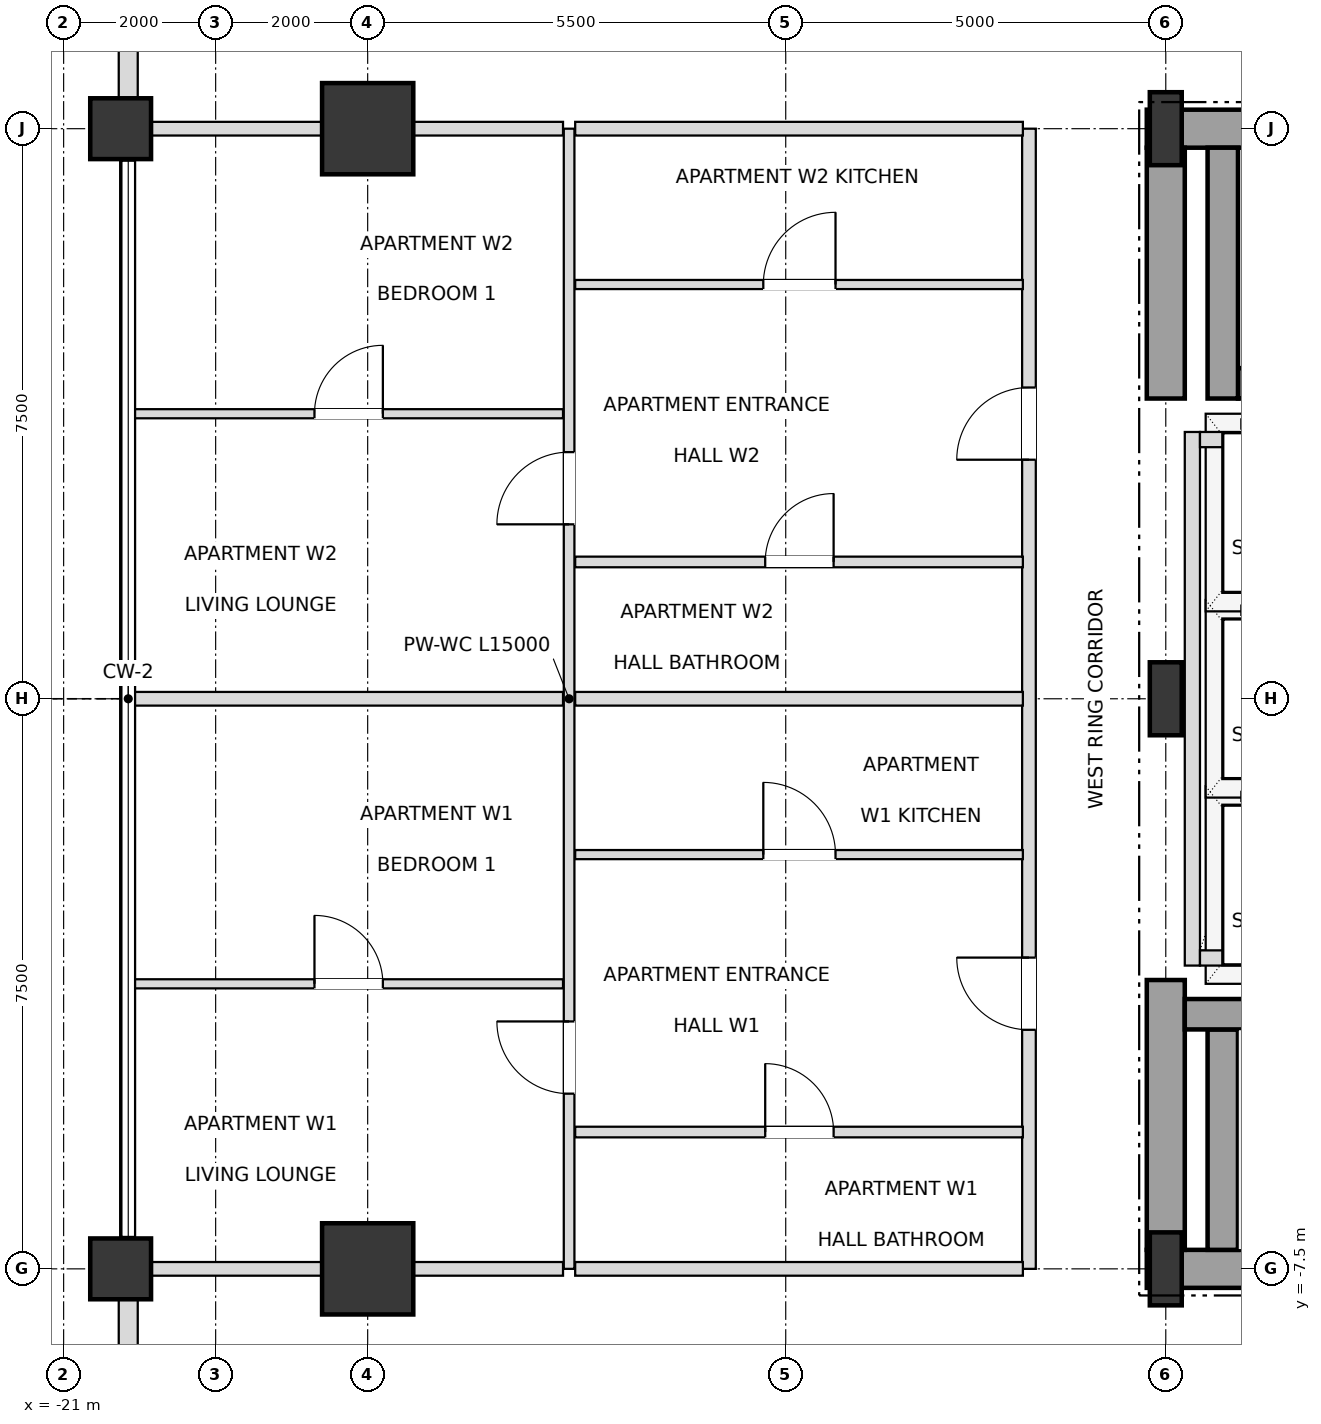
"""IFC4 building model, lengths in metres.
Left out: names, types, materials, properties, quantities, classifications, styles, units other than length and angle.
Written with IfcOpenShell. Run it as: python <this file> out.ifc"""

import sys

from ifc_helpers import new_model, si_unit, direction, frame, frame_2d, origin, origin_2d, place, context, subcontext, project, spatial, rectangle, i_section, extrude, element, fill, save


model = new_model("IFC4")
c1 = context("Model", 3, precision=1e-05, world=origin(), true_north=direction((0.0, 1.0)))
c2 = subcontext(c1, "Body", "Model", "MODEL_VIEW")
j1 = project(units=[si_unit("LENGTHUNIT", "METRE"), si_unit("PLANEANGLEUNIT", "RADIAN")], contexts=[c1])
p1 = place(None, origin())
s1 = spatial("IfcSite", under=j1, at=p1, CompositionType="ELEMENT")
p2 = place(p1, origin())
s2 = spatial("IfcBuilding", under=s1, at=p2, CompositionType="ELEMENT")
p3 = place(p2, frame((0.0, 0.0, 99.0)))
s3 = spatial("IfcBuildingStorey", under=s2, at=p3, CompositionType="ELEMENT", Elevation=99.0)
for number, where, z_axis, x_axis in (
    (1, (-6.5, -7.5, 0.0), (0.0, 0.0, 1.0), (1.0, 0.0, 0.0)),
    (2, (-6.5, 0.0, 0.0), (0.0, 0.0, 1.0), (1.0, 0.0, 0.0)),
    (3, (-6.5, 7.5, 0.0), (0.0, 0.0, 1.0), (1.0, 0.0, 0.0)),
):
    element("IfcColumn", number, at=place(p3, frame(where, z_axis=z_axis, x_axis=x_axis)), inside=s3, PredefinedType="COLUMN", context=c2, shape_type="SweptSolid", body=[
        extrude(i_section(OverallWidth=0.42, OverallDepth=0.96, WebThickness=0.022, FlangeThickness=0.034, at=origin_2d()), origin(), (0.0, 0.0, 1.0), 3.6),
    ])
for number, where, z_axis, x_axis in (
    (4, (-17.0, 7.5, 0.0), (0.0, 0.0, 1.0), (1.0, 0.0, 0.0)),
    (5, (-17.0, -7.5, 0.0), (0.0, 0.0, 1.0), (1.0, 0.0, 0.0)),
):
    element("IfcColumn", number, at=place(p3, frame(where, z_axis=z_axis, x_axis=x_axis)), inside=s3, PredefinedType="USERDEFINED", context=c2, shape_type="SweptSolid", body=[
        extrude(rectangle(XDim=1.2, YDim=1.2, at=origin_2d()), origin(), (0.0, 0.0, 1.0), 3.6),
    ])
for number, where, z_axis, x_axis in (
    (6, (-20.25, -7.5, 0.0), (0.0, 0.0, 1.0), (1.0, 0.0, 0.0)),
    (7, (-20.25, 7.5, 0.0), (0.0, 0.0, 1.0), (1.0, 0.0, 0.0)),
):
    element("IfcColumn", number, at=place(p3, frame(where, z_axis=z_axis, x_axis=x_axis)), inside=s3, PredefinedType="COLUMN", context=c2, shape_type="SweptSolid", body=[
        extrude(rectangle(XDim=0.8, YDim=0.8, at=origin_2d()), origin(), (0.0, 0.0, 1.0), 3.6),
    ])
p4 = place(p3, frame((-20.15, 12.605, 0.0), z_axis=(0.0, 0.0, 1.0), x_axis=(0.0, -1.0, 0.0)))
e8 = element("IfcWall", 8, at=p4, inside=s3, PredefinedType="SOLIDWALL", context=c2, shape_type="SweptSolid", body=[
    extrude(rectangle(XDim=4.71, YDim=0.25, at=frame_2d((2.355, 0.0))), origin(), (0.0, 0.0, 1.0), 2.736),
])
p5 = place(p4, frame((1.455, 0.0, 0.72)))
e9 = element("IfcOpeningElement", 9, at=p5, cuts=e8, PredefinedType="OPENING", context=c2, shape_type="SweptSolid", body=[
    extrude(rectangle(XDim=1.8, YDim=1.68, at=frame_2d((0.9, 0.84))), frame((0.0, 0.135, 0.0), z_axis=(0.0, -1.0, 0.0), x_axis=(1.0, 0.0, 0.0)), (0.0, 0.0, 1.0), 0.27),
])
p6 = place(p3, frame((-20.15, -7.895, 0.0), z_axis=(0.0, 0.0, 1.0), x_axis=(0.0, -1.0, 0.0)))
e10 = element("IfcWall", 10, at=p6, inside=s3, PredefinedType="SOLIDWALL", context=c2, shape_type="SweptSolid", body=[
    extrude(rectangle(XDim=4.71, YDim=0.25, at=frame_2d((2.355, 0.0))), origin(), (0.0, 0.0, 1.0), 2.736),
])
p7 = place(p6, frame((1.455, 0.0, 0.72)))
e11 = element("IfcOpeningElement", 11, at=p7, cuts=e10, PredefinedType="OPENING", context=c2, shape_type="SweptSolid", body=[
    extrude(rectangle(XDim=1.8, YDim=1.68, at=frame_2d((0.9, 0.84))), frame((0.0, 0.135, 0.0), z_axis=(0.0, -1.0, 0.0), x_axis=(1.0, 0.0, 0.0)), (0.0, 0.0, 1.0), 0.27),
])
p8 = place(p3, frame((-6.75, -7.5, 0.0), z_axis=(0.0, 0.0, 1.0), x_axis=(1.0, 0.0, 0.0)))
e12 = element("IfcWall", 12, at=p8, inside=s3, PredefinedType="SHEAR", context=c2, shape_type="SweptSolid", body=[
    extrude(rectangle(XDim=6.75, YDim=0.5, at=frame_2d((3.375, 0.0))), origin(), (0.0, 0.0, 1.0), 3.38),
])
p9 = place(p3, frame((-6.75, 7.5, 0.0), z_axis=(0.0, 0.0, 1.0), x_axis=(1.0, 0.0, 0.0)))
e13 = element("IfcWall", 13, at=p9, inside=s3, PredefinedType="SHEAR", context=c2, shape_type="SweptSolid", body=[
    extrude(rectangle(XDim=6.75, YDim=0.5, at=frame_2d((3.375, 0.0))), origin(), (0.0, 0.0, 1.0), 3.38),
])
p10 = place(p9, frame((1.65, 0.0, 0.0)))
e14 = element("IfcOpeningElement", 14, at=p10, cuts=e13, PredefinedType="OPENING", context=c2, shape_type="SweptSolid", body=[
    extrude(rectangle(XDim=1.05, YDim=2.15, at=frame_2d((0.525, 1.075))), frame((0.0, 0.26, 0.0), z_axis=(0.0, -1.0, 0.0), x_axis=(1.0, 0.0, 0.0)), (0.0, 0.0, 1.0), 0.52),
])
p11 = place(p3, frame((-6.5, -7.25, 0.0), z_axis=(0.0, 0.0, 1.0), x_axis=(0.0, 1.0, 0.0)))
e15 = element("IfcWall", 15, at=p11, inside=s3, PredefinedType="SHEAR", context=c2, shape_type="SweptSolid", body=[
    extrude(rectangle(XDim=3.55, YDim=0.5, at=frame_2d((1.775, 0.0))), origin(), (0.0, 0.0, 1.0), 3.38),
])
p12 = place(p3, frame((-6.5, 3.95, 0.0), z_axis=(0.0, 0.0, 1.0), x_axis=(0.0, 1.0, 0.0)))
e16 = element("IfcWall", 16, at=p12, inside=s3, PredefinedType="SHEAR", context=c2, shape_type="SweptSolid", body=[
    extrude(rectangle(XDim=3.3, YDim=0.5, at=frame_2d((1.65, 0.0))), origin(), (0.0, 0.0, 1.0), 3.38),
])
p13 = place(p3, frame((-5.75, -7.25, 0.0), z_axis=(0.0, 0.0, 1.0), x_axis=(0.0, 1.0, 0.0)))
e17 = element("IfcWall", 17, at=p13, inside=s3, PredefinedType="SHEAR", context=c2, shape_type="SweptSolid", body=[
    extrude(rectangle(XDim=2.9, YDim=0.4, at=frame_2d((1.45, 0.0))), origin(), (0.0, 0.0, 1.0), 3.38),
])
p14 = place(p3, frame((-6.25, -4.15, 0.0), z_axis=(0.0, 0.0, 1.0), x_axis=(1.0, 0.0, 0.0)))
e18 = element("IfcWall", 18, at=p14, inside=s3, PredefinedType="SHEAR", context=c2, shape_type="SweptSolid", body=[
    extrude(rectangle(XDim=7.78, YDim=0.4, at=frame_2d((3.89, 0.0))), origin(), (0.0, 0.0, 1.0), 3.38),
])
p15 = place(p3, frame((-5.55, 4.15, 0.0), z_axis=(0.0, 0.0, 1.0), x_axis=(1.0, 0.0, 0.0)))
e19 = element("IfcWall", 19, at=p15, inside=s3, PredefinedType="SHEAR", context=c2, shape_type="SweptSolid", body=[
    extrude(rectangle(XDim=7.08, YDim=0.4, at=frame_2d((3.54, 0.0))), origin(), (0.0, 0.0, 1.0), 3.38),
])
p16 = place(p3, frame((-5.75, 3.95, 0.0), z_axis=(0.0, 0.0, 1.0), x_axis=(0.0, 1.0, 0.0)))
e20 = element("IfcWall", 20, at=p16, inside=s3, PredefinedType="SHEAR", context=c2, shape_type="SweptSolid", body=[
    extrude(rectangle(XDim=3.3, YDim=0.4, at=frame_2d((1.65, 0.0))), origin(), (0.0, 0.0, 1.0), 3.38),
])
p17 = place(p3, frame((-6.15, -3.51, 0.0), z_axis=(0.0, 0.0, 1.0), x_axis=(0.0, 1.0, 0.0)))
e21 = element("IfcWall", 21, at=p17, inside=s3, PredefinedType="SOLIDWALL", context=c2, shape_type="SweptSolid", body=[
    extrude(rectangle(XDim=7.02, YDim=0.2, at=frame_2d((3.51, 0.0))), origin(), (0.0, 0.0, 1.0), 3.38),
])
for number, where, z_axis, x_axis in (
    (22, (-6.05, -3.41, 0.0), (0.0, 0.0, 1.0), (1.0, 0.0, 0.0)),
    (23, (-6.05, 3.41, 0.0), (0.0, 0.0, 1.0), (1.0, 0.0, 0.0)),
):
    element("IfcWall", number, at=place(p3, frame(where, z_axis=z_axis, x_axis=x_axis)), inside=s3, PredefinedType="SOLIDWALL", context=c2, shape_type="SweptSolid", body=[
        extrude(rectangle(XDim=2.2, YDim=0.2, at=frame_2d((1.1, 0.0))), origin(), (0.0, 0.0, 1.0), 3.38),
    ])
p18 = place(p3, frame((-14.35, -7.5, 0.0), z_axis=(0.0, 0.0, 1.0), x_axis=(0.0, 1.0, 0.0)))
e24 = element("IfcWall", 24, at=p18, inside=s3, PredefinedType="PARTITIONING", context=c2, shape_type="SweptSolid", body=[
    extrude(rectangle(XDim=15.0, YDim=0.14, at=frame_2d((7.5, 0.0))), origin(), (0.0, 0.0, 1.0), 3.38),
])
p19 = place(p18, frame((2.305, 0.0, 0.0)))
e25 = element("IfcOpeningElement", 25, at=p19, cuts=e24, PredefinedType="OPENING", context=c2, shape_type="SweptSolid", body=[
    extrude(rectangle(XDim=0.95, YDim=2.1, at=frame_2d((0.475, 1.05))), frame((0.0, 0.08, 0.0), z_axis=(0.0, -1.0, 0.0), x_axis=(1.0, 0.0, 0.0)), (0.0, 0.0, 1.0), 0.16),
])
p20 = place(p18, frame((9.795, 0.0, 0.0)))
e26 = element("IfcOpeningElement", 26, at=p20, cuts=e24, PredefinedType="OPENING", context=c2, shape_type="SweptSolid", body=[
    extrude(rectangle(XDim=0.95, YDim=2.1, at=frame_2d((0.475, 1.05))), frame((0.0, 0.08, 0.0), z_axis=(0.0, -1.0, 0.0), x_axis=(1.0, 0.0, 0.0)), (0.0, 0.0, 1.0), 0.16),
])
p21 = place(p3, frame((-8.3, -7.5, 0.0), z_axis=(0.0, 0.0, 1.0), x_axis=(0.0, 1.0, 0.0)))
e27 = element("IfcWall", 27, at=p21, inside=s3, PredefinedType="PARTITIONING", context=c2, shape_type="SweptSolid", body=[
    extrude(rectangle(XDim=15.0, YDim=0.18, at=frame_2d((7.5, 0.0))), origin(), (0.0, 0.0, 1.0), 3.38),
])
p22 = place(p21, frame((3.145, 0.0, 0.0)))
e28 = element("IfcOpeningElement", 28, at=p22, cuts=e27, PredefinedType="OPENING", context=c2, shape_type="SweptSolid", body=[
    extrude(rectangle(XDim=0.95, YDim=2.15, at=frame_2d((0.475, 1.075))), frame((0.0, 0.1, 0.0), z_axis=(0.0, -1.0, 0.0), x_axis=(1.0, 0.0, 0.0)), (0.0, 0.0, 1.0), 0.2),
])
p23 = place(p21, frame((10.645, 0.0, 0.0)))
e29 = element("IfcOpeningElement", 29, at=p23, cuts=e27, PredefinedType="OPENING", context=c2, shape_type="SweptSolid", body=[
    extrude(rectangle(XDim=0.95, YDim=2.15, at=frame_2d((0.475, 1.075))), frame((0.0, 0.1, 0.0), z_axis=(0.0, -1.0, 0.0), x_axis=(1.0, 0.0, 0.0)), (0.0, 0.0, 1.0), 0.2),
])
p24 = place(p3, frame((-20.15, -7.5, 0.0), z_axis=(0.0, 0.0, 1.0), x_axis=(1.0, 0.0, 0.0)))
e30 = element("IfcWall", 30, at=p24, inside=s3, PredefinedType="PARTITIONING", context=c2, shape_type="SweptSolid", body=[
    extrude(rectangle(XDim=5.72, YDim=0.18, at=frame_2d((2.86, 0.0))), origin(), (0.0, 0.0, 1.0), 2.816),
])
p25 = place(p3, frame((-14.27, -7.5, 0.0), z_axis=(0.0, 0.0, 1.0), x_axis=(1.0, 0.0, 0.0)))
e31 = element("IfcWall", 31, at=p25, inside=s3, PredefinedType="PARTITIONING", context=c2, shape_type="SweptSolid", body=[
    extrude(rectangle(XDim=5.89, YDim=0.18, at=frame_2d((2.945, 0.0))), origin(), (0.0, 0.0, 1.0), 2.816),
])
p26 = place(p3, frame((-14.27, -5.7, 0.0), z_axis=(0.0, 0.0, 1.0), x_axis=(1.0, 0.0, 0.0)))
e32 = element("IfcWall", 32, at=p26, inside=s3, PredefinedType="PARTITIONING", context=c2, shape_type="SweptSolid", body=[
    extrude(rectangle(XDim=5.89, YDim=0.14, at=frame_2d((2.945, 0.0))), origin(), (0.0, 0.0, 1.0), 3.38),
])
p27 = place(p26, frame((2.5, 0.0, 0.0)))
e33 = element("IfcOpeningElement", 33, at=p27, cuts=e32, PredefinedType="OPENING", context=c2, shape_type="SweptSolid", body=[
    extrude(rectangle(XDim=0.9, YDim=2.1, at=frame_2d((0.45, 1.05))), frame((0.0, 0.08, 0.0), z_axis=(0.0, -1.0, 0.0), x_axis=(1.0, 0.0, 0.0)), (0.0, 0.0, 1.0), 0.16),
])
p28 = place(p3, frame((-20.07, -3.75, 0.0), z_axis=(0.0, 0.0, 1.0), x_axis=(1.0, 0.0, 0.0)))
e34 = element("IfcWall", 34, at=p28, inside=s3, PredefinedType="PARTITIONING", context=c2, shape_type="SweptSolid", body=[
    extrude(rectangle(XDim=5.64, YDim=0.12, at=frame_2d((2.82, 0.0))), origin(), (0.0, 0.0, 1.0), 2.816),
])
p29 = place(p28, frame((2.37, 0.0, 0.0)))
e35 = element("IfcOpeningElement", 35, at=p29, cuts=e34, PredefinedType="OPENING", context=c2, shape_type="SweptSolid", body=[
    extrude(rectangle(XDim=0.9, YDim=2.1, at=frame_2d((0.45, 1.05))), frame((0.0, 0.07, 0.0), z_axis=(0.0, -1.0, 0.0), x_axis=(1.0, 0.0, 0.0)), (0.0, 0.0, 1.0), 0.14),
])
p30 = place(p3, frame((-14.27, -2.05, 0.0), z_axis=(0.0, 0.0, 1.0), x_axis=(1.0, 0.0, 0.0)))
e36 = element("IfcWall", 36, at=p30, inside=s3, PredefinedType="PARTITIONING", context=c2, shape_type="SweptSolid", body=[
    extrude(rectangle(XDim=5.89, YDim=0.12, at=frame_2d((2.945, 0.0))), origin(), (0.0, 0.0, 1.0), 3.38),
])
p31 = place(p30, frame((2.475, 0.0, 0.0)))
e37 = element("IfcOpeningElement", 37, at=p31, cuts=e36, PredefinedType="OPENING", context=c2, shape_type="SweptSolid", body=[
    extrude(rectangle(XDim=0.95, YDim=2.1, at=frame_2d((0.475, 1.05))), frame((0.0, 0.07, 0.0), z_axis=(0.0, -1.0, 0.0), x_axis=(1.0, 0.0, 0.0)), (0.0, 0.0, 1.0), 0.14),
])
p32 = place(p3, frame((-20.07, 0.0, 0.0), z_axis=(0.0, 0.0, 1.0), x_axis=(1.0, 0.0, 0.0)))
e38 = element("IfcWall", 38, at=p32, inside=s3, PredefinedType="PARTITIONING", context=c2, shape_type="SweptSolid", body=[
    extrude(rectangle(XDim=5.64, YDim=0.18, at=frame_2d((2.82, 0.0))), origin(), (0.0, 0.0, 1.0), 2.816),
])
p33 = place(p3, frame((-14.27, 0.0, 0.0), z_axis=(0.0, 0.0, 1.0), x_axis=(1.0, 0.0, 0.0)))
e39 = element("IfcWall", 39, at=p33, inside=s3, PredefinedType="PARTITIONING", context=c2, shape_type="SweptSolid", body=[
    extrude(rectangle(XDim=5.89, YDim=0.18, at=frame_2d((2.945, 0.0))), origin(), (0.0, 0.0, 1.0), 3.38),
])
p34 = place(p3, frame((-14.27, 1.8, 0.0), z_axis=(0.0, 0.0, 1.0), x_axis=(1.0, 0.0, 0.0)))
e40 = element("IfcWall", 40, at=p34, inside=s3, PredefinedType="PARTITIONING", context=c2, shape_type="SweptSolid", body=[
    extrude(rectangle(XDim=5.89, YDim=0.14, at=frame_2d((2.945, 0.0))), origin(), (0.0, 0.0, 1.0), 3.38),
])
p35 = place(p34, frame((2.5, 0.0, 0.0)))
e41 = element("IfcOpeningElement", 41, at=p35, cuts=e40, PredefinedType="OPENING", context=c2, shape_type="SweptSolid", body=[
    extrude(rectangle(XDim=0.9, YDim=2.1, at=frame_2d((0.45, 1.05))), frame((0.0, 0.08, 0.0), z_axis=(0.0, -1.0, 0.0), x_axis=(1.0, 0.0, 0.0)), (0.0, 0.0, 1.0), 0.16),
])
p36 = place(p3, frame((-20.07, 3.75, 0.0), z_axis=(0.0, 0.0, 1.0), x_axis=(1.0, 0.0, 0.0)))
e42 = element("IfcWall", 42, at=p36, inside=s3, PredefinedType="PARTITIONING", context=c2, shape_type="SweptSolid", body=[
    extrude(rectangle(XDim=5.64, YDim=0.12, at=frame_2d((2.82, 0.0))), origin(), (0.0, 0.0, 1.0), 2.816),
])
p37 = place(p36, frame((2.37, 0.0, 0.0)))
e43 = element("IfcOpeningElement", 43, at=p37, cuts=e42, PredefinedType="OPENING", context=c2, shape_type="SweptSolid", body=[
    extrude(rectangle(XDim=0.9, YDim=2.1, at=frame_2d((0.45, 1.05))), frame((0.0, 0.07, 0.0), z_axis=(0.0, -1.0, 0.0), x_axis=(1.0, 0.0, 0.0)), (0.0, 0.0, 1.0), 0.14),
])
p38 = place(p3, frame((-14.27, 5.45, 0.0), z_axis=(0.0, 0.0, 1.0), x_axis=(1.0, 0.0, 0.0)))
e44 = element("IfcWall", 44, at=p38, inside=s3, PredefinedType="PARTITIONING", context=c2, shape_type="SweptSolid", body=[
    extrude(rectangle(XDim=5.89, YDim=0.12, at=frame_2d((2.945, 0.0))), origin(), (0.0, 0.0, 1.0), 3.38),
])
p39 = place(p38, frame((2.475, 0.0, 0.0)))
e45 = element("IfcOpeningElement", 45, at=p39, cuts=e44, PredefinedType="OPENING", context=c2, shape_type="SweptSolid", body=[
    extrude(rectangle(XDim=0.95, YDim=2.1, at=frame_2d((0.475, 1.05))), frame((0.0, 0.07, 0.0), z_axis=(0.0, -1.0, 0.0), x_axis=(1.0, 0.0, 0.0)), (0.0, 0.0, 1.0), 0.14),
])
p40 = place(p3, frame((-20.15, 7.5, 0.0), z_axis=(0.0, 0.0, 1.0), x_axis=(1.0, 0.0, 0.0)))
e46 = element("IfcWall", 46, at=p40, inside=s3, PredefinedType="PARTITIONING", context=c2, shape_type="SweptSolid", body=[
    extrude(rectangle(XDim=5.72, YDim=0.18, at=frame_2d((2.86, 0.0))), origin(), (0.0, 0.0, 1.0), 2.816),
])
p41 = place(p3, frame((-14.27, 7.5, 0.0), z_axis=(0.0, 0.0, 1.0), x_axis=(1.0, 0.0, 0.0)))
e47 = element("IfcWall", 47, at=p41, inside=s3, PredefinedType="PARTITIONING", context=c2, shape_type="SweptSolid", body=[
    extrude(rectangle(XDim=5.89, YDim=0.18, at=frame_2d((2.945, 0.0))), origin(), (0.0, 0.0, 1.0), 2.816),
])
p42 = place(p27, origin())
e48 = element("IfcDoor", 48, at=p42, inside=s3, OperationType="SINGLE_SWING_LEFT", PredefinedType="DOOR", context=c2, shape_type="SweptSolid", body=[
    extrude(rectangle(XDim=0.9, YDim=2.1, at=frame_2d((0.45, 1.05))), frame((0.0, 0.025, 0.0), z_axis=(0.0, -1.0, 0.0), x_axis=(1.0, 0.0, 0.0)), (0.0, 0.0, 1.0), 0.05),
])
fill(e33, e48)
p43 = place(p22, origin())
e49 = element("IfcDoor", 49, at=p43, inside=s3, OperationType="SINGLE_SWING_RIGHT", PredefinedType="DOOR", context=c2, shape_type="SweptSolid", body=[
    extrude(rectangle(XDim=0.95, YDim=2.15, at=frame_2d((0.475, 1.075))), frame((0.0, 0.025, 0.0), z_axis=(0.0, -1.0, 0.0), x_axis=(1.0, 0.0, 0.0)), (0.0, 0.0, 1.0), 0.05),
])
fill(e28, e49)
p44 = place(p31, origin())
e50 = element("IfcDoor", 50, at=p44, inside=s3, OperationType="SINGLE_SWING_LEFT", PredefinedType="DOOR", context=c2, shape_type="SweptSolid", body=[
    extrude(rectangle(XDim=0.95, YDim=2.1, at=frame_2d((0.475, 1.05))), frame((0.0, 0.025, 0.0), z_axis=(0.0, -1.0, 0.0), x_axis=(1.0, 0.0, 0.0)), (0.0, 0.0, 1.0), 0.05),
])
fill(e37, e50)
p45 = place(p19, origin())
e51 = element("IfcDoor", 51, at=p45, inside=s3, OperationType="SINGLE_SWING_RIGHT", PredefinedType="DOOR", context=c2, shape_type="SweptSolid", body=[
    extrude(rectangle(XDim=0.95, YDim=2.1, at=frame_2d((0.475, 1.05))), frame((0.0, 0.025, 0.0), z_axis=(0.0, -1.0, 0.0), x_axis=(1.0, 0.0, 0.0)), (0.0, 0.0, 1.0), 0.05),
])
fill(e25, e51)
p46 = place(p29, origin())
e52 = element("IfcDoor", 52, at=p46, inside=s3, OperationType="SINGLE_SWING_LEFT", PredefinedType="DOOR", context=c2, shape_type="SweptSolid", body=[
    extrude(rectangle(XDim=0.9, YDim=2.1, at=frame_2d((0.45, 1.05))), frame((0.0, 0.025, 0.0), z_axis=(0.0, -1.0, 0.0), x_axis=(1.0, 0.0, 0.0)), (0.0, 0.0, 1.0), 0.05),
])
fill(e35, e52)
p47 = place(p35, origin())
e53 = element("IfcDoor", 53, at=p47, inside=s3, OperationType="SINGLE_SWING_RIGHT", PredefinedType="DOOR", context=c2, shape_type="SweptSolid", body=[
    extrude(rectangle(XDim=0.9, YDim=2.1, at=frame_2d((0.45, 1.05))), frame((0.0, 0.025, 0.0), z_axis=(0.0, -1.0, 0.0), x_axis=(1.0, 0.0, 0.0)), (0.0, 0.0, 1.0), 0.05),
])
fill(e41, e53)
p48 = place(p23, origin())
e54 = element("IfcDoor", 54, at=p48, inside=s3, OperationType="SINGLE_SWING_LEFT", PredefinedType="DOOR", context=c2, shape_type="SweptSolid", body=[
    extrude(rectangle(XDim=0.95, YDim=2.15, at=frame_2d((0.475, 1.075))), frame((0.0, 0.025, 0.0), z_axis=(0.0, -1.0, 0.0), x_axis=(1.0, 0.0, 0.0)), (0.0, 0.0, 1.0), 0.05),
])
fill(e29, e54)
p49 = place(p39, origin())
e55 = element("IfcDoor", 55, at=p49, inside=s3, OperationType="SINGLE_SWING_RIGHT", PredefinedType="DOOR", context=c2, shape_type="SweptSolid", body=[
    extrude(rectangle(XDim=0.95, YDim=2.1, at=frame_2d((0.475, 1.05))), frame((0.0, 0.025, 0.0), z_axis=(0.0, -1.0, 0.0), x_axis=(1.0, 0.0, 0.0)), (0.0, 0.0, 1.0), 0.05),
])
fill(e45, e55)
p50 = place(p20, origin())
e56 = element("IfcDoor", 56, at=p50, inside=s3, OperationType="SINGLE_SWING_LEFT", PredefinedType="DOOR", context=c2, shape_type="SweptSolid", body=[
    extrude(rectangle(XDim=0.95, YDim=2.1, at=frame_2d((0.475, 1.05))), frame((0.0, 0.025, 0.0), z_axis=(0.0, -1.0, 0.0), x_axis=(1.0, 0.0, 0.0)), (0.0, 0.0, 1.0), 0.05),
])
fill(e26, e56)
p51 = place(p37, origin())
e57 = element("IfcDoor", 57, at=p51, inside=s3, OperationType="SINGLE_SWING_RIGHT", PredefinedType="DOOR", context=c2, shape_type="SweptSolid", body=[
    extrude(rectangle(XDim=0.9, YDim=2.1, at=frame_2d((0.45, 1.05))), frame((0.0, 0.025, 0.0), z_axis=(0.0, -1.0, 0.0), x_axis=(1.0, 0.0, 0.0)), (0.0, 0.0, 1.0), 0.05),
])
fill(e43, e57)
save(model, sys.argv[1])
